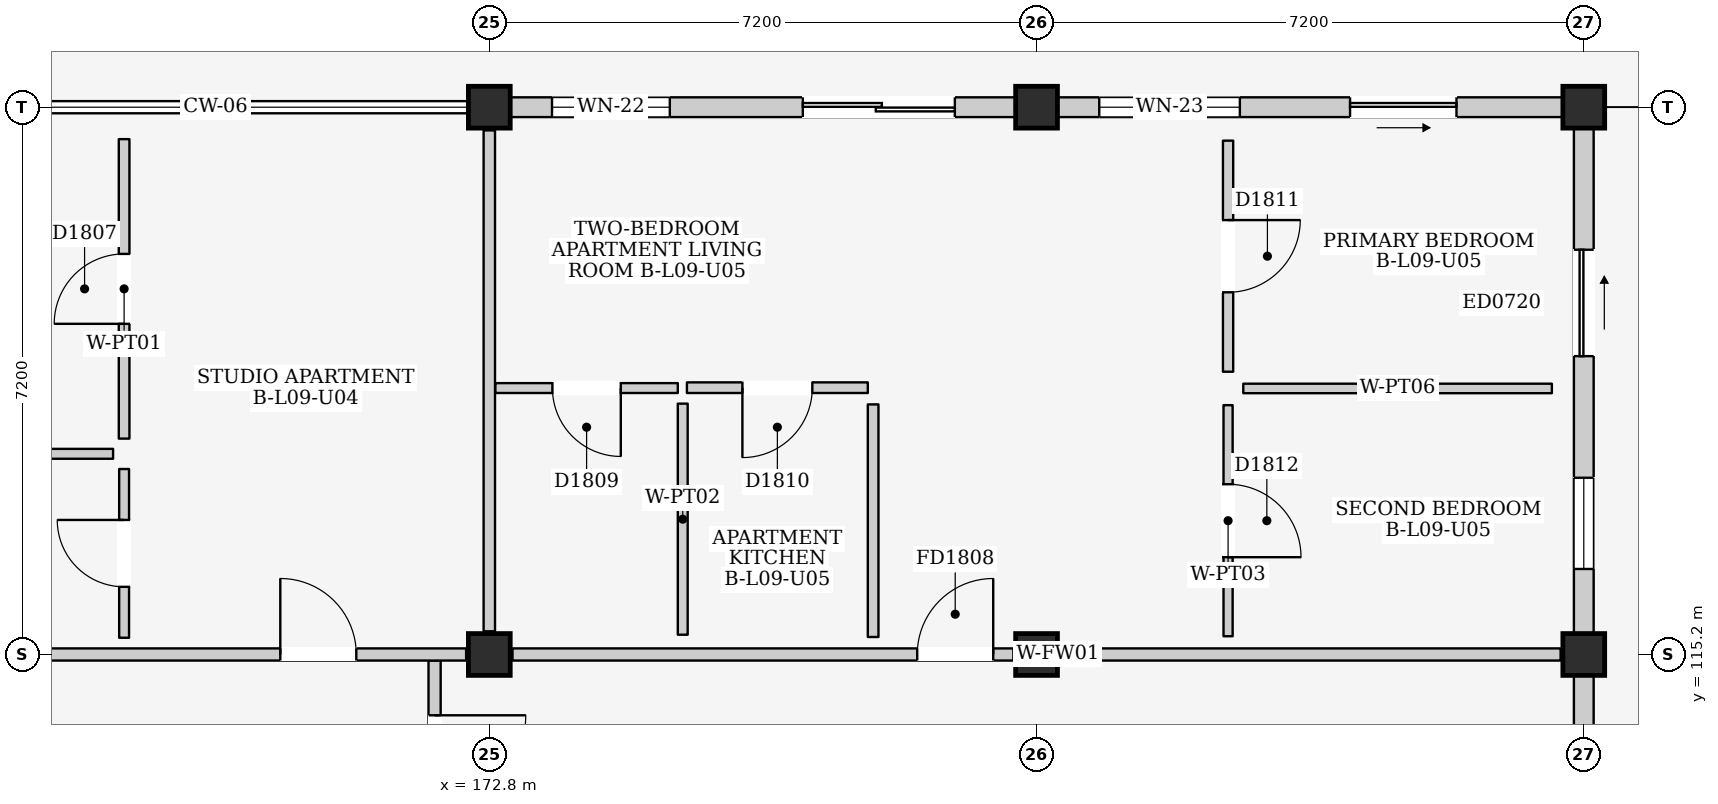
"""IFC4 building model, lengths in metres.
Left out: names, types, materials, properties, quantities, classifications, styles, units other than length and angle.
Written with IfcOpenShell. Run it as: python <this file> out.ifc"""

import sys

from ifc_helpers import new_model, si_unit, direction, frame, frame_2d, origin, origin_2d, place, context, subcontext, project, spatial, rectangle, extrude, element, fill, save


model = new_model("IFC4")
c1 = context("Model", 3, precision=1e-05, world=origin(), true_north=direction((0.0, 1.0)))
c2 = subcontext(c1, "Body", "Model", "MODEL_VIEW")
j1 = project(units=[si_unit("LENGTHUNIT", "METRE"), si_unit("PLANEANGLEUNIT", "RADIAN")], contexts=[c1])
p1 = place(None, origin())
s1 = spatial("IfcSite", under=j1, at=p1, CompositionType="ELEMENT")
p2 = place(p1, origin())
s2 = spatial("IfcBuilding", under=s1, at=p2, CompositionType="ELEMENT")
p3 = place(p2, frame((0.0, 0.0, 31.5)))
s3 = spatial("IfcBuildingStorey", under=s2, at=p3, CompositionType="ELEMENT", Elevation=31.5)
for number, where, z_axis, x_axis in (
    (1, (172.8, 115.2, 0.0), (0.0, 0.0, 1.0), (1.0, 0.0, 0.0)),
    (2, (172.8, 122.4, 0.0), (0.0, 0.0, 1.0), (1.0, 0.0, 0.0)),
    (3, (180.0, 115.2, 0.0), (0.0, 0.0, 1.0), (1.0, 0.0, 0.0)),
    (4, (180.0, 122.4, 0.0), (0.0, 0.0, 1.0), (1.0, 0.0, 0.0)),
    (5, (187.2, 115.2, 0.0), (0.0, 0.0, 1.0), (1.0, 0.0, 0.0)),
    (6, (187.2, 122.4, 0.0), (0.0, 0.0, 1.0), (1.0, 0.0, 0.0)),
):
    element("IfcColumn", number, at=place(p3, frame(where, z_axis=z_axis, x_axis=x_axis)), inside=s3, PredefinedType="COLUMN", context=c2, shape_type="SweptSolid", body=[
        extrude(rectangle(XDim=0.55, YDim=0.55, at=origin_2d()), origin(), (0.0, 0.0, 1.0), 3.3),
    ])
p4 = place(p3, frame((173.075, 122.4, 0.0), z_axis=(0.0, 0.0, 1.0), x_axis=(1.0, 0.0, 0.0)))
e7 = element("IfcWall", 7, at=p4, inside=s3, PredefinedType="ELEMENTEDWALL", context=c2, shape_type="SweptSolid", body=[
    extrude(rectangle(XDim=6.65, YDim=0.26, at=frame_2d((3.325, 0.0))), origin(), (0.0, 0.0, 1.0), 2.615),
])
p5 = place(p4, frame((3.85, 0.0, 0.0)))
e8 = element("IfcOpeningElement", 8, at=p5, cuts=e7, PredefinedType="OPENING", context=c2, shape_type="SweptSolid", body=[
    extrude(rectangle(XDim=2.0, YDim=2.12, at=frame_2d((1.0, 1.06))), frame((0.0, 0.145, 0.0), z_axis=(0.0, -1.0, 0.0), x_axis=(1.0, 0.0, 0.0)), (0.0, 0.0, 1.0), 0.29),
])
p6 = place(p4, frame((0.55, 0.0, 0.9)))
e9 = element("IfcOpeningElement", 9, at=p6, cuts=e7, PredefinedType="OPENING", context=c2, shape_type="SweptSolid", body=[
    extrude(rectangle(XDim=1.55, YDim=1.45, at=frame_2d((0.775, 0.725))), frame((0.0, 0.145, 0.0), z_axis=(0.0, -1.0, 0.0), x_axis=(1.0, 0.0, 0.0)), (0.0, 0.0, 1.0), 0.29),
])
p7 = place(p3, frame((187.2, 108.275, 0.0), z_axis=(0.0, 0.0, 1.0), x_axis=(0.0, 1.0, 0.0)))
e10 = element("IfcWall", 10, at=p7, inside=s3, PredefinedType="ELEMENTEDWALL", context=c2, shape_type="SweptSolid", body=[
    extrude(rectangle(XDim=6.65, YDim=0.26, at=frame_2d((3.325, 0.0))), origin(), (0.0, 0.0, 1.0), 2.615),
])
p8 = place(p7, frame((3.65, 0.0, 0.0)))
e11 = element("IfcOpeningElement", 11, at=p8, cuts=e10, PredefinedType="OPENING", context=c2, shape_type="SweptSolid", body=[
    extrude(rectangle(XDim=1.4, YDim=2.1, at=frame_2d((0.7, 1.05))), frame((0.0, 0.145, 0.0), z_axis=(0.0, -1.0, 0.0), x_axis=(1.0, 0.0, 0.0)), (0.0, 0.0, 1.0), 0.29),
])
p9 = place(p3, frame((180.275, 122.4, 0.0), z_axis=(0.0, 0.0, 1.0), x_axis=(1.0, 0.0, 0.0)))
e12 = element("IfcWall", 12, at=p9, inside=s3, PredefinedType="ELEMENTEDWALL", context=c2, shape_type="SweptSolid", body=[
    extrude(rectangle(XDim=6.65, YDim=0.26, at=frame_2d((3.325, 0.0))), origin(), (0.0, 0.0, 1.0), 2.615),
])
p10 = place(p9, frame((3.85, 0.0, 0.0)))
e13 = element("IfcOpeningElement", 13, at=p10, cuts=e12, PredefinedType="OPENING", context=c2, shape_type="SweptSolid", body=[
    extrude(rectangle(XDim=1.4, YDim=2.1, at=frame_2d((0.7, 1.05))), frame((0.0, 0.145, 0.0), z_axis=(0.0, -1.0, 0.0), x_axis=(1.0, 0.0, 0.0)), (0.0, 0.0, 1.0), 0.29),
])
p11 = place(p9, frame((0.55, 0.0, 0.9)))
e14 = element("IfcOpeningElement", 14, at=p11, cuts=e12, PredefinedType="OPENING", context=c2, shape_type="SweptSolid", body=[
    extrude(rectangle(XDim=1.85, YDim=1.4, at=frame_2d((0.925, 0.7))), frame((0.0, 0.145, 0.0), z_axis=(0.0, -1.0, 0.0), x_axis=(1.0, 0.0, 0.0)), (0.0, 0.0, 1.0), 0.29),
])
p12 = place(p3, frame((187.2, 115.475, 0.0), z_axis=(0.0, 0.0, 1.0), x_axis=(0.0, 1.0, 0.0)))
e15 = element("IfcWall", 15, at=p12, inside=s3, PredefinedType="ELEMENTEDWALL", context=c2, shape_type="SweptSolid", body=[
    extrude(rectangle(XDim=6.65, YDim=0.26, at=frame_2d((3.325, 0.0))), origin(), (0.0, 0.0, 1.0), 2.615),
])
p13 = place(p12, frame((3.65, 0.0, 0.0)))
e16 = element("IfcOpeningElement", 16, at=p13, cuts=e15, PredefinedType="OPENING", context=c2, shape_type="SweptSolid", body=[
    extrude(rectangle(XDim=1.4, YDim=2.1, at=frame_2d((0.7, 1.05))), frame((0.0, 0.145, 0.0), z_axis=(0.0, -1.0, 0.0), x_axis=(1.0, 0.0, 0.0)), (0.0, 0.0, 1.0), 0.29),
])
p14 = place(p12, frame((0.85, 0.0, 0.95)))
e17 = element("IfcOpeningElement", 17, at=p14, cuts=e15, PredefinedType="OPENING", context=c2, shape_type="SweptSolid", body=[
    extrude(rectangle(XDim=1.2, YDim=1.35, at=frame_2d((0.6, 0.675))), frame((0.0, 0.145, 0.0), z_axis=(0.0, -1.0, 0.0), x_axis=(1.0, 0.0, 0.0)), (0.0, 0.0, 1.0), 0.29),
])
p15 = place(p3, frame((172.08, 110.8, 0.0), z_axis=(0.0, 0.0, 1.0), x_axis=(0.0, 1.0, 0.0)))
e18 = element("IfcWall", 18, at=p15, inside=s3, PredefinedType="PARTITIONING", context=c2, shape_type="SweptSolid", body=[
    extrude(rectangle(XDim=4.32, YDim=0.16, at=frame_2d((2.16, 0.0))), origin(), (0.0, 0.0, 1.0), 3.08),
])
p16 = place(p15, frame((2.4, 0.0, 0.0)))
e19 = element("IfcOpeningElement", 19, at=p16, cuts=e18, PredefinedType="OPENING", context=c2, shape_type="SweptSolid", body=[
    extrude(rectangle(XDim=1.2, YDim=2.2, at=frame_2d((0.6, 1.1))), frame((0.0, 0.095, 0.0), z_axis=(0.0, -1.0, 0.0), x_axis=(1.0, 0.0, 0.0)), (0.0, 0.0, 1.0), 0.19),
])
p17 = place(p3, frame((165.905, 115.2, 0.0), z_axis=(0.0, 0.0, 1.0), x_axis=(1.0, 0.0, 0.0)))
e20 = element("IfcWall", 20, at=p17, inside=s3, PredefinedType="PARTITIONING", context=c2, shape_type="SweptSolid", body=[
    extrude(rectangle(XDim=6.59, YDim=0.16, at=frame_2d((3.295, 0.0))), origin(), (0.0, 0.0, 1.0), 2.465),
])
p18 = place(p17, frame((4.145, 0.0, 0.0)))
e21 = element("IfcOpeningElement", 21, at=p18, cuts=e20, PredefinedType="OPENING", context=c2, shape_type="SweptSolid", body=[
    extrude(rectangle(XDim=1.0, YDim=2.15, at=frame_2d((0.5, 1.075))), frame((0.0, 0.095, 0.0), z_axis=(0.0, -1.0, 0.0), x_axis=(1.0, 0.0, 0.0)), (0.0, 0.0, 1.0), 0.19),
])
p19 = place(p3, frame((172.8, 115.505, 0.0), z_axis=(0.0, 0.0, 1.0), x_axis=(0.0, 1.0, 0.0)))
e22 = element("IfcWall", 22, at=p19, inside=s3, PredefinedType="PARTITIONING", context=c2, shape_type="SweptSolid", body=[
    extrude(rectangle(XDim=6.59, YDim=0.15, at=frame_2d((3.295, 0.0))), origin(), (0.0, 0.0, 1.0), 2.565),
])
p20 = place(p3, frame((165.8, 117.84, 0.0), z_axis=(0.0, 0.0, 1.0), x_axis=(1.0, 0.0, 0.0)))
e23 = element("IfcWall", 23, at=p20, inside=s3, PredefinedType="PARTITIONING", context=c2, shape_type="SweptSolid", body=[
    extrude(rectangle(XDim=2.05, YDim=0.13, at=frame_2d((1.025, 0.0))), origin(), (0.0, 0.0, 1.0), 3.08),
])
p21 = place(p3, frame((167.995, 115.42, 0.0), z_axis=(0.0, 0.0, 1.0), x_axis=(0.0, 1.0, 0.0)))
e24 = element("IfcWall", 24, at=p21, inside=s3, PredefinedType="PARTITIONING", context=c2, shape_type="SweptSolid", body=[
    extrude(rectangle(XDim=2.22, YDim=0.13, at=frame_2d((1.11, 0.0))), origin(), (0.0, 0.0, 1.0), 3.08),
])
p22 = place(p21, frame((0.67, 0.0, 0.0)))
e25 = element("IfcOpeningElement", 25, at=p22, cuts=e24, PredefinedType="OPENING", context=c2, shape_type="SweptSolid", body=[
    extrude(rectangle(XDim=0.88, YDim=2.1, at=frame_2d((0.44, 1.05))), frame((0.0, 0.08, 0.0), z_axis=(0.0, -1.0, 0.0), x_axis=(1.0, 0.0, 0.0)), (0.0, 0.0, 1.0), 0.16),
])
p23 = place(p3, frame((167.995, 118.04, 0.0), z_axis=(0.0, 0.0, 1.0), x_axis=(0.0, 1.0, 0.0)))
e26 = element("IfcWall", 26, at=p23, inside=s3, PredefinedType="PARTITIONING", context=c2, shape_type="SweptSolid", body=[
    extrude(rectangle(XDim=3.94, YDim=0.14, at=frame_2d((1.97, 0.0))), origin(), (0.0, 0.0, 1.0), 3.08),
])
p24 = place(p23, frame((1.51, 0.0, 0.0)))
e27 = element("IfcOpeningElement", 27, at=p24, cuts=e26, PredefinedType="OPENING", context=c2, shape_type="SweptSolid", body=[
    extrude(rectangle(XDim=0.92, YDim=2.1, at=frame_2d((0.46, 1.05))), frame((0.0, 0.085, 0.0), z_axis=(0.0, -1.0, 0.0), x_axis=(1.0, 0.0, 0.0)), (0.0, 0.0, 1.0), 0.17),
])
p25 = place(p3, frame((173.105, 115.2, 0.0), z_axis=(0.0, 0.0, 1.0), x_axis=(1.0, 0.0, 0.0)))
e28 = element("IfcWall", 28, at=p25, inside=s3, PredefinedType="PARTITIONING", context=c2, shape_type="SweptSolid", body=[
    extrude(rectangle(XDim=6.59, YDim=0.16, at=frame_2d((3.295, 0.0))), origin(), (0.0, 0.0, 1.0), 2.465),
])
p26 = place(p25, frame((5.325, 0.0, 0.0)))
e29 = element("IfcOpeningElement", 29, at=p26, cuts=e28, PredefinedType="OPENING", context=c2, shape_type="SweptSolid", body=[
    extrude(rectangle(XDim=1.0, YDim=2.15, at=frame_2d((0.5, 1.075))), frame((0.0, 0.095, 0.0), z_axis=(0.0, -1.0, 0.0), x_axis=(1.0, 0.0, 0.0)), (0.0, 0.0, 1.0), 0.19),
])
p27 = place(p3, frame((180.305, 115.2, 0.0), z_axis=(0.0, 0.0, 1.0), x_axis=(1.0, 0.0, 0.0)))
e30 = element("IfcWall", 30, at=p27, inside=s3, PredefinedType="PARTITIONING", context=c2, shape_type="SweptSolid", body=[
    extrude(rectangle(XDim=6.59, YDim=0.16, at=frame_2d((3.295, 0.0))), origin(), (0.0, 0.0, 1.0), 2.465),
])
p28 = place(p3, frame((172.88, 118.705, 0.0), z_axis=(0.0, 0.0, 1.0), x_axis=(1.0, 0.0, 0.0)))
e31 = element("IfcWall", 31, at=p28, inside=s3, PredefinedType="PARTITIONING", context=c2, shape_type="SweptSolid", body=[
    extrude(rectangle(XDim=2.4, YDim=0.13, at=frame_2d((1.2, 0.0))), origin(), (0.0, 0.0, 1.0), 3.08),
])
p29 = place(p28, frame((0.75, 0.0, 0.0)))
e32 = element("IfcOpeningElement", 32, at=p29, cuts=e31, PredefinedType="OPENING", context=c2, shape_type="SweptSolid", body=[
    extrude(rectangle(XDim=0.9, YDim=2.1, at=frame_2d((0.45, 1.05))), frame((0.0, 0.08, 0.0), z_axis=(0.0, -1.0, 0.0), x_axis=(1.0, 0.0, 0.0)), (0.0, 0.0, 1.0), 0.16),
])
p30 = place(p3, frame((175.345, 115.46, 0.0), z_axis=(0.0, 0.0, 1.0), x_axis=(0.0, 1.0, 0.0)))
e33 = element("IfcWall", 33, at=p30, inside=s3, PredefinedType="PARTITIONING", context=c2, shape_type="SweptSolid", body=[
    extrude(rectangle(XDim=3.04, YDim=0.13, at=frame_2d((1.52, 0.0))), origin(), (0.0, 0.0, 1.0), 3.08),
])
p31 = place(p3, frame((175.4, 118.71, 0.0), z_axis=(0.0, 0.0, 1.0), x_axis=(1.0, 0.0, 0.0)))
e34 = element("IfcWall", 34, at=p31, inside=s3, PredefinedType="PARTITIONING", context=c2, shape_type="SweptSolid", body=[
    extrude(rectangle(XDim=2.38, YDim=0.14, at=frame_2d((1.19, 0.0))), origin(), (0.0, 0.0, 1.0), 3.08),
])
p32 = place(p31, frame((0.73, 0.0, 0.0)))
e35 = element("IfcOpeningElement", 35, at=p32, cuts=e34, PredefinedType="OPENING", context=c2, shape_type="SweptSolid", body=[
    extrude(rectangle(XDim=0.92, YDim=2.1, at=frame_2d((0.46, 1.05))), frame((0.0, 0.085, 0.0), z_axis=(0.0, -1.0, 0.0), x_axis=(1.0, 0.0, 0.0)), (0.0, 0.0, 1.0), 0.17),
])
p33 = place(p3, frame((177.85, 115.43, 0.0), z_axis=(0.0, 0.0, 1.0), x_axis=(0.0, 1.0, 0.0)))
e36 = element("IfcWall", 36, at=p33, inside=s3, PredefinedType="PARTITIONING", context=c2, shape_type="SweptSolid", body=[
    extrude(rectangle(XDim=3.06, YDim=0.14, at=frame_2d((1.53, 0.0))), origin(), (0.0, 0.0, 1.0), 3.08),
])
p34 = place(p3, frame((182.52, 118.92, 0.0), z_axis=(0.0, 0.0, 1.0), x_axis=(0.0, 1.0, 0.0)))
e37 = element("IfcWall", 37, at=p34, inside=s3, PredefinedType="PARTITIONING", context=c2, shape_type="SweptSolid", body=[
    extrude(rectangle(XDim=3.04, YDim=0.135, at=frame_2d((1.52, 0.0))), origin(), (0.0, 0.0, 1.0), 3.08),
])
p35 = place(p34, frame((1.045, 0.0, 0.0)))
e38 = element("IfcOpeningElement", 38, at=p35, cuts=e37, PredefinedType="OPENING", context=c2, shape_type="SweptSolid", body=[
    extrude(rectangle(XDim=0.95, YDim=2.15, at=frame_2d((0.475, 1.075))), frame((0.0, 0.083, 0.0), z_axis=(0.0, -1.0, 0.0), x_axis=(1.0, 0.0, 0.0)), (0.0, 0.0, 1.0), 0.165),
])
p36 = place(p3, frame((182.72, 118.7, 0.0), z_axis=(0.0, 0.0, 1.0), x_axis=(1.0, 0.0, 0.0)))
e39 = element("IfcWall", 39, at=p36, inside=s3, PredefinedType="PARTITIONING", context=c2, shape_type="SweptSolid", body=[
    extrude(rectangle(XDim=4.06, YDim=0.125, at=frame_2d((2.03, 0.0))), origin(), (0.0, 0.0, 1.0), 3.08),
])
p37 = place(p3, frame((182.52, 115.44, 0.0), z_axis=(0.0, 0.0, 1.0), x_axis=(0.0, 1.0, 0.0)))
e40 = element("IfcWall", 40, at=p37, inside=s3, PredefinedType="PARTITIONING", context=c2, shape_type="SweptSolid", body=[
    extrude(rectangle(XDim=3.04, YDim=0.12, at=frame_2d((1.52, 0.0))), origin(), (0.0, 0.0, 1.0), 3.08),
])
p38 = place(p37, frame((1.04, 0.0, 0.0)))
e41 = element("IfcOpeningElement", 41, at=p38, cuts=e40, PredefinedType="OPENING", context=c2, shape_type="SweptSolid", body=[
    extrude(rectangle(XDim=0.96, YDim=2.15, at=frame_2d((0.48, 1.075))), frame((0.0, 0.075, 0.0), z_axis=(0.0, -1.0, 0.0), x_axis=(1.0, 0.0, 0.0)), (0.0, 0.0, 1.0), 0.15),
])
p39 = place(p5, frame((2.0, 0.0, 0.0), z_axis=(0.0, 0.0, 1.0), x_axis=(-1.0, 0.0, 0.0)))
e42 = element("IfcDoor", 42, at=p39, inside=s3, OperationType="DOUBLE_DOOR_SLIDING", PredefinedType="DOOR", context=c2, shape_type="SweptSolid", body=[
    extrude(rectangle(XDim=2.0, YDim=2.12, at=frame_2d((1.0, 1.06))), frame((0.0, 0.025, 0.0), z_axis=(0.0, -1.0, 0.0), x_axis=(1.0, 0.0, 0.0)), (0.0, 0.0, 1.0), 0.05),
])
fill(e8, e42)
p40 = place(p6, origin())
e43 = element("IfcWindow", 43, at=p40, inside=s3, PartitioningType="DOUBLE_PANEL_VERTICAL", PredefinedType="WINDOW", context=c2, shape_type="SweptSolid", body=[
    extrude(rectangle(XDim=1.55, YDim=1.45, at=frame_2d((0.775, 0.725))), frame((0.0, 0.03, 0.0), z_axis=(0.0, -1.0, 0.0), x_axis=(1.0, 0.0, 0.0)), (0.0, 0.0, 1.0), 0.06),
])
fill(e9, e43)
p41 = place(p10, frame((1.4, 0.0, 0.0), z_axis=(0.0, 0.0, 1.0), x_axis=(-1.0, 0.0, 0.0)))
e44 = element("IfcDoor", 44, at=p41, inside=s3, OperationType="SLIDING_TO_RIGHT", PredefinedType="DOOR", context=c2, shape_type="SweptSolid", body=[
    extrude(rectangle(XDim=1.4, YDim=2.1, at=frame_2d((0.7, 1.05))), frame((0.0, 0.025, 0.0), z_axis=(0.0, -1.0, 0.0), x_axis=(1.0, 0.0, 0.0)), (0.0, 0.0, 1.0), 0.05),
])
fill(e13, e44)
p42 = place(p11, origin())
e45 = element("IfcWindow", 45, at=p42, inside=s3, PartitioningType="DOUBLE_PANEL_VERTICAL", PredefinedType="WINDOW", context=c2, shape_type="SweptSolid", body=[
    extrude(rectangle(XDim=1.85, YDim=1.4, at=frame_2d((0.925, 0.7))), frame((0.0, 0.03, 0.0), z_axis=(0.0, -1.0, 0.0), x_axis=(1.0, 0.0, 0.0)), (0.0, 0.0, 1.0), 0.06),
])
fill(e14, e45)
p43 = place(p13, frame((1.4, 0.0, 0.0), z_axis=(0.0, 0.0, 1.0), x_axis=(-1.0, 0.0, 0.0)))
e46 = element("IfcDoor", 46, at=p43, inside=s3, OperationType="SLIDING_TO_RIGHT", PredefinedType="DOOR", context=c2, shape_type="SweptSolid", body=[
    extrude(rectangle(XDim=1.4, YDim=2.1, at=frame_2d((0.7, 1.05))), frame((0.0, 0.025, 0.0), z_axis=(0.0, -1.0, 0.0), x_axis=(1.0, 0.0, 0.0)), (0.0, 0.0, 1.0), 0.05),
])
fill(e16, e46)
p44 = place(p14, origin())
e47 = element("IfcWindow", 47, at=p44, inside=s3, PartitioningType="SINGLE_PANEL", PredefinedType="WINDOW", context=c2, shape_type="SweptSolid", body=[
    extrude(rectangle(XDim=1.2, YDim=1.35, at=frame_2d((0.6, 0.675))), frame((0.0, 0.03, 0.0), z_axis=(0.0, -1.0, 0.0), x_axis=(1.0, 0.0, 0.0)), (0.0, 0.0, 1.0), 0.06),
])
fill(e17, e47)
p45 = place(p16, frame((1.2, 0.0, 0.0), z_axis=(0.0, 0.0, 1.0), x_axis=(-1.0, 0.0, 0.0)))
e48 = element("IfcDoor", 48, at=p45, inside=s3, OperationType="SINGLE_SWING_LEFT", PredefinedType="DOOR", context=c2, shape_type="SweptSolid", body=[
    extrude(rectangle(XDim=1.2, YDim=2.2, at=frame_2d((0.6, 1.1))), frame((0.0, 0.025, 0.0), z_axis=(0.0, -1.0, 0.0), x_axis=(1.0, 0.0, 0.0)), (0.0, 0.0, 1.0), 0.05),
])
fill(e19, e48)
p46 = place(p18, origin())
e49 = element("IfcDoor", 49, at=p46, inside=s3, OperationType="SINGLE_SWING_LEFT", PredefinedType="DOOR", context=c2, shape_type="SweptSolid", body=[
    extrude(rectangle(XDim=1.0, YDim=2.15, at=frame_2d((0.5, 1.075))), frame((0.0, 0.025, 0.0), z_axis=(0.0, -1.0, 0.0), x_axis=(1.0, 0.0, 0.0)), (0.0, 0.0, 1.0), 0.05),
])
fill(e21, e49)
p47 = place(p22, origin())
e50 = element("IfcDoor", 50, at=p47, inside=s3, OperationType="SINGLE_SWING_RIGHT", PredefinedType="DOOR", context=c2, shape_type="SweptSolid", body=[
    extrude(rectangle(XDim=0.88, YDim=2.1, at=frame_2d((0.44, 1.05))), frame((0.0, 0.025, 0.0), z_axis=(0.0, -1.0, 0.0), x_axis=(1.0, 0.0, 0.0)), (0.0, 0.0, 1.0), 0.05),
])
fill(e25, e50)
p48 = place(p24, origin())
e51 = element("IfcDoor", 51, at=p48, inside=s3, OperationType="SINGLE_SWING_LEFT", PredefinedType="DOOR", context=c2, shape_type="SweptSolid", body=[
    extrude(rectangle(XDim=0.92, YDim=2.1, at=frame_2d((0.46, 1.05))), frame((0.0, 0.025, 0.0), z_axis=(0.0, -1.0, 0.0), x_axis=(1.0, 0.0, 0.0)), (0.0, 0.0, 1.0), 0.05),
])
fill(e27, e51)
p49 = place(p26, origin())
e52 = element("IfcDoor", 52, at=p49, inside=s3, OperationType="SINGLE_SWING_RIGHT", PredefinedType="DOOR", context=c2, shape_type="SweptSolid", body=[
    extrude(rectangle(XDim=1.0, YDim=2.15, at=frame_2d((0.5, 1.075))), frame((0.0, 0.025, 0.0), z_axis=(0.0, -1.0, 0.0), x_axis=(1.0, 0.0, 0.0)), (0.0, 0.0, 1.0), 0.05),
])
fill(e29, e52)
p50 = place(p29, frame((0.9, 0.0, 0.0), z_axis=(0.0, 0.0, 1.0), x_axis=(-1.0, 0.0, 0.0)))
e53 = element("IfcDoor", 53, at=p50, inside=s3, OperationType="SINGLE_SWING_LEFT", PredefinedType="DOOR", context=c2, shape_type="SweptSolid", body=[
    extrude(rectangle(XDim=0.9, YDim=2.1, at=frame_2d((0.45, 1.05))), frame((0.0, 0.025, 0.0), z_axis=(0.0, -1.0, 0.0), x_axis=(1.0, 0.0, 0.0)), (0.0, 0.0, 1.0), 0.05),
])
fill(e32, e53)
p51 = place(p32, frame((0.92, 0.0, 0.0), z_axis=(0.0, 0.0, 1.0), x_axis=(-1.0, 0.0, 0.0)))
e54 = element("IfcDoor", 54, at=p51, inside=s3, OperationType="SINGLE_SWING_RIGHT", PredefinedType="DOOR", context=c2, shape_type="SweptSolid", body=[
    extrude(rectangle(XDim=0.92, YDim=2.1, at=frame_2d((0.46, 1.05))), frame((0.0, 0.025, 0.0), z_axis=(0.0, -1.0, 0.0), x_axis=(1.0, 0.0, 0.0)), (0.0, 0.0, 1.0), 0.05),
])
fill(e35, e54)
p52 = place(p35, frame((0.95, 0.0, 0.0), z_axis=(0.0, 0.0, 1.0), x_axis=(-1.0, 0.0, 0.0)))
e55 = element("IfcDoor", 55, at=p52, inside=s3, OperationType="SINGLE_SWING_LEFT", PredefinedType="DOOR", context=c2, shape_type="SweptSolid", body=[
    extrude(rectangle(XDim=0.95, YDim=2.15, at=frame_2d((0.475, 1.075))), frame((0.0, 0.025, 0.0), z_axis=(0.0, -1.0, 0.0), x_axis=(1.0, 0.0, 0.0)), (0.0, 0.0, 1.0), 0.05),
])
fill(e38, e55)
p53 = place(p38, frame((0.96, 0.0, 0.0), z_axis=(0.0, 0.0, 1.0), x_axis=(-1.0, 0.0, 0.0)))
e56 = element("IfcDoor", 56, at=p53, inside=s3, OperationType="SINGLE_SWING_RIGHT", PredefinedType="DOOR", context=c2, shape_type="SweptSolid", body=[
    extrude(rectangle(XDim=0.96, YDim=2.15, at=frame_2d((0.48, 1.075))), frame((0.0, 0.025, 0.0), z_axis=(0.0, -1.0, 0.0), x_axis=(1.0, 0.0, 0.0)), (0.0, 0.0, 1.0), 0.05),
])
fill(e41, e56)
save(model, sys.argv[1])
